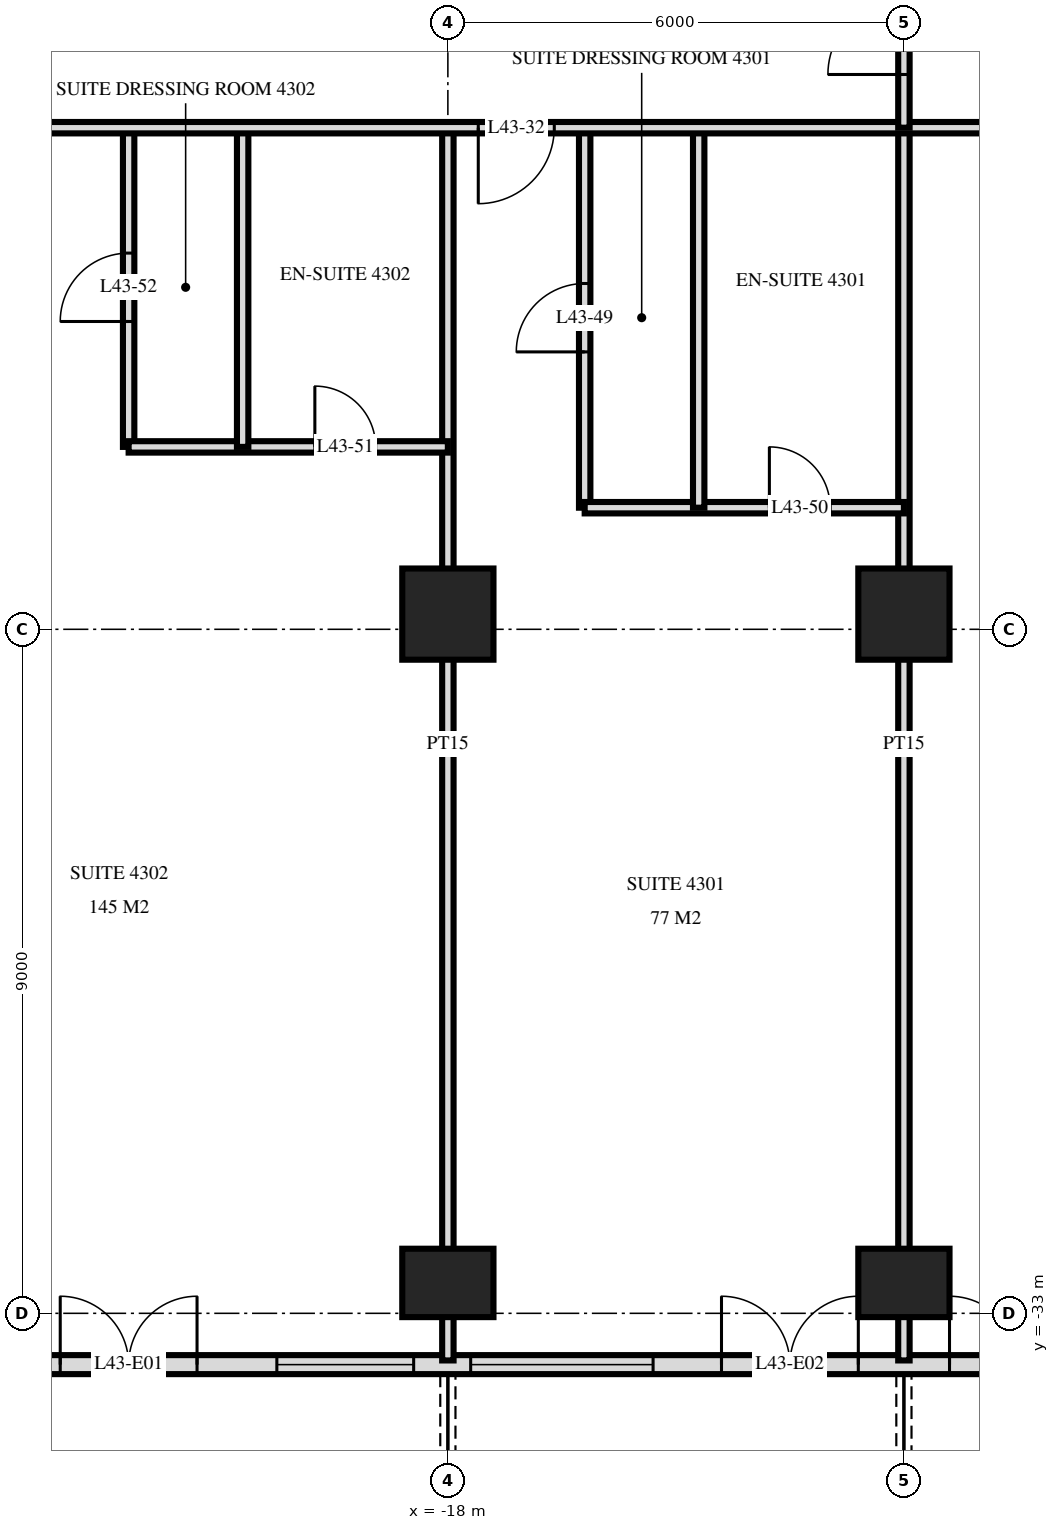
"""IFC4 building model, lengths in metres.
Left out: names, types, materials, properties, quantities, classifications, styles, units other than length and angle.
Written with IfcOpenShell. Run it as: python <this file> out.ifc"""

import sys

from ifc_helpers import new_model, si_unit, direction, frame, frame_2d, origin, origin_2d, place, context, subcontext, project, spatial, rectangle, extrude, element, fill, save


model = new_model("IFC4")
c1 = context("Model", 3, precision=1e-05, world=origin(), true_north=direction((0.0, 1.0)))
c2 = subcontext(c1, "Body", "Model", "MODEL_VIEW")
j1 = project(units=[si_unit("LENGTHUNIT", "METRE"), si_unit("PLANEANGLEUNIT", "RADIAN")], contexts=[c1])
p1 = place(None, origin())
s1 = spatial("IfcSite", under=j1, at=p1, CompositionType="ELEMENT")
p2 = place(p1, origin())
s2 = spatial("IfcBuilding", under=s1, at=p2, CompositionType="ELEMENT")
p3 = place(p2, frame((0.0, 0.0, 166.8)))
s3 = spatial("IfcBuildingStorey", under=s2, at=p3, CompositionType="ELEMENT", Elevation=166.8)
p4 = place(p3, frame((-18.0, -32.6, 0.0), z_axis=(0.0, 0.0, 1.0), x_axis=(1.0, 0.0, 0.0)))
e1 = element("IfcColumn", 1, at=p4, inside=s3, PredefinedType="COLUMN", context=c2, shape_type="SweptSolid", body=[
    extrude(rectangle(XDim=1.2, YDim=0.9, at=origin_2d()), origin(), (0.0, 0.0, 1.0), 3.6),
])
p5 = place(p3, frame((-18.0, -23.8, 0.0), z_axis=(0.0, 0.0, 1.0), x_axis=(1.0, 0.0, 0.0)))
e2 = element("IfcColumn", 2, at=p5, inside=s3, PredefinedType="COLUMN", context=c2, shape_type="SweptSolid", body=[
    extrude(rectangle(XDim=1.2, YDim=1.2, at=origin_2d()), origin(), (0.0, 0.0, 1.0), 3.6),
])
p6 = place(p3, frame((-12.0, -32.6, 0.0), z_axis=(0.0, 0.0, 1.0), x_axis=(1.0, 0.0, 0.0)))
e3 = element("IfcColumn", 3, at=p6, inside=s3, PredefinedType="COLUMN", context=c2, shape_type="SweptSolid", body=[
    extrude(rectangle(XDim=1.2, YDim=0.9, at=origin_2d()), origin(), (0.0, 0.0, 1.0), 3.6),
])
p7 = place(p3, frame((-12.0, -23.8, 0.0), z_axis=(0.0, 0.0, 1.0), x_axis=(1.0, 0.0, 0.0)))
e4 = element("IfcColumn", 4, at=p7, inside=s3, PredefinedType="COLUMN", context=c2, shape_type="SweptSolid", body=[
    extrude(rectangle(XDim=1.2, YDim=1.2, at=origin_2d()), origin(), (0.0, 0.0, 1.0), 3.6),
])
p8 = place(p3, frame((-23.675, -33.675, 0.0), z_axis=(0.0, 0.0, 1.0), x_axis=(1.0, 0.0, 0.0)))
e5 = element("IfcWall", 5, at=p8, inside=s3, PredefinedType="SOLIDWALL", context=c2, shape_type="SweptSolid", body=[
    extrude(rectangle(XDim=47.351, YDim=0.25, at=frame_2d((23.675, 0.0))), origin(), (0.0, 0.0, 1.0), 3.32),
])
p9 = place(p8, frame((0.575, 0.0, 0.0)))
e6 = element("IfcOpeningElement", 6, at=p9, cuts=e5, PredefinedType="OPENING", context=c2, shape_type="SweptSolid", body=[
    extrude(rectangle(XDim=1.8, YDim=2.4, at=frame_2d((0.9, 1.2))), frame((0.0, 0.135, 0.0), z_axis=(0.0, -1.0, 0.0), x_axis=(1.0, 0.0, 0.0)), (0.0, 0.0, 1.0), 0.27),
])
p10 = place(p8, frame((3.425, 0.0, 0.3)))
e7 = element("IfcOpeningElement", 7, at=p10, cuts=e5, PredefinedType="OPENING", context=c2, shape_type="SweptSolid", body=[
    extrude(rectangle(XDim=1.8, YDim=2.1, at=frame_2d((0.9, 1.05))), frame((0.0, 0.135, 0.0), z_axis=(0.0, -1.0, 0.0), x_axis=(1.0, 0.0, 0.0)), (0.0, 0.0, 1.0), 0.27),
])
p11 = place(p8, frame((5.975, 0.0, 0.3)))
e8 = element("IfcOpeningElement", 8, at=p11, cuts=e5, PredefinedType="OPENING", context=c2, shape_type="SweptSolid", body=[
    extrude(rectangle(XDim=2.4, YDim=2.1, at=frame_2d((1.2, 1.05))), frame((0.0, 0.135, 0.0), z_axis=(0.0, -1.0, 0.0), x_axis=(1.0, 0.0, 0.0)), (0.0, 0.0, 1.0), 0.27),
])
p12 = place(p8, frame((9.275, 0.0, 0.0)))
e9 = element("IfcOpeningElement", 9, at=p12, cuts=e5, PredefinedType="OPENING", context=c2, shape_type="SweptSolid", body=[
    extrude(rectangle(XDim=1.8, YDim=2.4, at=frame_2d((0.9, 1.2))), frame((0.0, 0.135, 0.0), z_axis=(0.0, -1.0, 0.0), x_axis=(1.0, 0.0, 0.0)), (0.0, 0.0, 1.0), 0.27),
])
p13 = place(p8, frame((12.275, 0.0, 0.0)))
e10 = element("IfcOpeningElement", 10, at=p13, cuts=e5, PredefinedType="OPENING", context=c2, shape_type="SweptSolid", body=[
    extrude(rectangle(XDim=1.8, YDim=2.4, at=frame_2d((0.9, 1.2))), frame((0.0, 0.135, 0.0), z_axis=(0.0, -1.0, 0.0), x_axis=(1.0, 0.0, 0.0)), (0.0, 0.0, 1.0), 0.27),
])
p14 = place(p8, frame((14.975, 0.0, 0.3)))
e11 = element("IfcOpeningElement", 11, at=p14, cuts=e5, PredefinedType="OPENING", context=c2, shape_type="SweptSolid", body=[
    extrude(rectangle(XDim=2.4, YDim=2.1, at=frame_2d((1.2, 1.05))), frame((0.0, 0.135, 0.0), z_axis=(0.0, -1.0, 0.0), x_axis=(1.0, 0.0, 0.0)), (0.0, 0.0, 1.0), 0.27),
])
p15 = place(p8, frame((17.975, 0.0, 0.3)))
e12 = element("IfcOpeningElement", 12, at=p15, cuts=e5, PredefinedType="OPENING", context=c2, shape_type="SweptSolid", body=[
    extrude(rectangle(XDim=2.4, YDim=2.1, at=frame_2d((1.2, 1.05))), frame((0.0, 0.135, 0.0), z_axis=(0.0, -1.0, 0.0), x_axis=(1.0, 0.0, 0.0)), (0.0, 0.0, 1.0), 0.27),
])
p16 = place(p8, frame((21.275, 0.0, 0.0)))
e13 = element("IfcOpeningElement", 13, at=p16, cuts=e5, PredefinedType="OPENING", context=c2, shape_type="SweptSolid", body=[
    extrude(rectangle(XDim=1.8, YDim=2.4, at=frame_2d((0.9, 1.2))), frame((0.0, 0.135, 0.0), z_axis=(0.0, -1.0, 0.0), x_axis=(1.0, 0.0, 0.0)), (0.0, 0.0, 1.0), 0.27),
])
p17 = place(p8, frame((24.275, 0.0, 0.0)))
e14 = element("IfcOpeningElement", 14, at=p17, cuts=e5, PredefinedType="OPENING", context=c2, shape_type="SweptSolid", body=[
    extrude(rectangle(XDim=1.8, YDim=2.4, at=frame_2d((0.9, 1.2))), frame((0.0, 0.135, 0.0), z_axis=(0.0, -1.0, 0.0), x_axis=(1.0, 0.0, 0.0)), (0.0, 0.0, 1.0), 0.27),
])
p18 = place(p8, frame((26.975, 0.0, 0.3)))
e15 = element("IfcOpeningElement", 15, at=p18, cuts=e5, PredefinedType="OPENING", context=c2, shape_type="SweptSolid", body=[
    extrude(rectangle(XDim=2.4, YDim=2.1, at=frame_2d((1.2, 1.05))), frame((0.0, 0.135, 0.0), z_axis=(0.0, -1.0, 0.0), x_axis=(1.0, 0.0, 0.0)), (0.0, 0.0, 1.0), 0.27),
])
p19 = place(p8, frame((30.275, 0.0, 0.0)))
e16 = element("IfcOpeningElement", 16, at=p19, cuts=e5, PredefinedType="OPENING", context=c2, shape_type="SweptSolid", body=[
    extrude(rectangle(XDim=1.8, YDim=2.4, at=frame_2d((0.9, 1.2))), frame((0.0, 0.135, 0.0), z_axis=(0.0, -1.0, 0.0), x_axis=(1.0, 0.0, 0.0)), (0.0, 0.0, 1.0), 0.27),
])
p20 = place(p8, frame((32.975, 0.0, 0.3)))
e17 = element("IfcOpeningElement", 17, at=p20, cuts=e5, PredefinedType="OPENING", context=c2, shape_type="SweptSolid", body=[
    extrude(rectangle(XDim=2.4, YDim=2.1, at=frame_2d((1.2, 1.05))), frame((0.0, 0.135, 0.0), z_axis=(0.0, -1.0, 0.0), x_axis=(1.0, 0.0, 0.0)), (0.0, 0.0, 1.0), 0.27),
])
p21 = place(p8, frame((35.975, 0.0, 0.3)))
e18 = element("IfcOpeningElement", 18, at=p21, cuts=e5, PredefinedType="OPENING", context=c2, shape_type="SweptSolid", body=[
    extrude(rectangle(XDim=2.4, YDim=2.1, at=frame_2d((1.2, 1.05))), frame((0.0, 0.135, 0.0), z_axis=(0.0, -1.0, 0.0), x_axis=(1.0, 0.0, 0.0)), (0.0, 0.0, 1.0), 0.27),
])
p22 = place(p8, frame((39.275, 0.0, 0.0)))
e19 = element("IfcOpeningElement", 19, at=p22, cuts=e5, PredefinedType="OPENING", context=c2, shape_type="SweptSolid", body=[
    extrude(rectangle(XDim=1.8, YDim=2.4, at=frame_2d((0.9, 1.2))), frame((0.0, 0.135, 0.0), z_axis=(0.0, -1.0, 0.0), x_axis=(1.0, 0.0, 0.0)), (0.0, 0.0, 1.0), 0.27),
])
p23 = place(p8, frame((42.275, 0.0, 0.0)))
e20 = element("IfcOpeningElement", 20, at=p23, cuts=e5, PredefinedType="OPENING", context=c2, shape_type="SweptSolid", body=[
    extrude(rectangle(XDim=1.8, YDim=2.4, at=frame_2d((0.9, 1.2))), frame((0.0, 0.135, 0.0), z_axis=(0.0, -1.0, 0.0), x_axis=(1.0, 0.0, 0.0)), (0.0, 0.0, 1.0), 0.27),
])
p24 = place(p8, frame((45.125, 0.0, 0.3)))
e21 = element("IfcOpeningElement", 21, at=p24, cuts=e5, PredefinedType="OPENING", context=c2, shape_type="SweptSolid", body=[
    extrude(rectangle(XDim=1.8, YDim=2.1, at=frame_2d((0.9, 1.05))), frame((0.0, 0.135, 0.0), z_axis=(0.0, -1.0, 0.0), x_axis=(1.0, 0.0, 0.0)), (0.0, 0.0, 1.0), 0.27),
])
p25 = place(p3, frame((-12.0, -17.4, 0.0), z_axis=(0.0, 0.0, 1.0), x_axis=(0.0, 1.0, 0.0)))
e22 = element("IfcWall", 22, at=p25, inside=s3, PredefinedType="PARTITIONING", context=c2, shape_type="SweptSolid", body=[
    extrude(rectangle(XDim=2.35, YDim=0.15, at=frame_2d((1.175, 0.0))), origin(), (0.0, 0.0, 1.0), 3.32),
])
p26 = place(p25, frame((0.7, 0.0, 0.0)))
e23 = element("IfcOpeningElement", 23, at=p26, cuts=e22, PredefinedType="OPENING", context=c2, shape_type="SweptSolid", body=[
    extrude(rectangle(XDim=1.0, YDim=2.1, at=frame_2d((0.5, 1.05))), frame((0.0, 0.085, 0.0), z_axis=(0.0, -1.0, 0.0), x_axis=(1.0, 0.0, 0.0)), (0.0, 0.0, 1.0), 0.17),
])
p27 = place(p3, frame((-12.0, -33.62, 0.0), z_axis=(0.0, 0.0, 1.0), x_axis=(0.0, 1.0, 0.0)))
e24 = element("IfcWall", 24, at=p27, inside=s3, PredefinedType="PARTITIONING", context=c2, shape_type="SweptSolid", body=[
    extrude(rectangle(XDim=16.22, YDim=0.15, at=frame_2d((8.11, 0.0))), origin(), (0.0, 0.0, 1.0), 3.32),
])
p28 = place(p3, frame((-14.7, -22.4, 0.0), z_axis=(0.0, 0.0, 1.0), x_axis=(0.0, 1.0, 0.0)))
e25 = element("IfcWall", 25, at=p28, inside=s3, PredefinedType="PARTITIONING", context=c2, shape_type="SweptSolid", body=[
    extrude(rectangle(XDim=5.0, YDim=0.15, at=frame_2d((2.5, 0.0))), origin(), (0.0, 0.0, 1.0), 3.32),
])
p29 = place(p3, frame((-16.2, -22.4, 0.0), z_axis=(0.0, 0.0, 1.0), x_axis=(0.0, 1.0, 0.0)))
e26 = element("IfcWall", 26, at=p29, inside=s3, PredefinedType="PARTITIONING", context=c2, shape_type="SweptSolid", body=[
    extrude(rectangle(XDim=5.0, YDim=0.15, at=frame_2d((2.5, 0.0))), origin(), (0.0, 0.0, 1.0), 3.32),
])
p30 = place(p29, frame((2.05, 0.0, 0.0)))
e27 = element("IfcOpeningElement", 27, at=p30, cuts=e26, PredefinedType="OPENING", context=c2, shape_type="SweptSolid", body=[
    extrude(rectangle(XDim=0.9, YDim=2.1, at=frame_2d((0.45, 1.05))), frame((0.0, 0.085, 0.0), z_axis=(0.0, -1.0, 0.0), x_axis=(1.0, 0.0, 0.0)), (0.0, 0.0, 1.0), 0.17),
])
p31 = place(p3, frame((-18.0, -33.62, 0.0), z_axis=(0.0, 0.0, 1.0), x_axis=(0.0, 1.0, 0.0)))
e28 = element("IfcWall", 28, at=p31, inside=s3, PredefinedType="PARTITIONING", context=c2, shape_type="SweptSolid", body=[
    extrude(rectangle(XDim=16.22, YDim=0.15, at=frame_2d((8.11, 0.0))), origin(), (0.0, 0.0, 1.0), 3.32),
])
p32 = place(p3, frame((-20.7, -21.6, 0.0), z_axis=(0.0, 0.0, 1.0), x_axis=(0.0, 1.0, 0.0)))
e29 = element("IfcWall", 29, at=p32, inside=s3, PredefinedType="PARTITIONING", context=c2, shape_type="SweptSolid", body=[
    extrude(rectangle(XDim=4.2, YDim=0.15, at=frame_2d((2.1, 0.0))), origin(), (0.0, 0.0, 1.0), 3.32),
])
p33 = place(p3, frame((-22.2, -21.6, 0.0), z_axis=(0.0, 0.0, 1.0), x_axis=(0.0, 1.0, 0.0)))
e30 = element("IfcWall", 30, at=p33, inside=s3, PredefinedType="PARTITIONING", context=c2, shape_type="SweptSolid", body=[
    extrude(rectangle(XDim=4.2, YDim=0.15, at=frame_2d((2.1, 0.0))), origin(), (0.0, 0.0, 1.0), 3.32),
])
p34 = place(p33, frame((1.65, 0.0, 0.0)))
e31 = element("IfcOpeningElement", 31, at=p34, cuts=e30, PredefinedType="OPENING", context=c2, shape_type="SweptSolid", body=[
    extrude(rectangle(XDim=0.9, YDim=2.1, at=frame_2d((0.45, 1.05))), frame((0.0, 0.085, 0.0), z_axis=(0.0, -1.0, 0.0), x_axis=(1.0, 0.0, 0.0)), (0.0, 0.0, 1.0), 0.17),
])
p35 = place(p3, frame((-16.2, -22.4, 0.0), z_axis=(0.0, 0.0, 1.0), x_axis=(1.0, 0.0, 0.0)))
e32 = element("IfcWall", 32, at=p35, inside=s3, PredefinedType="PARTITIONING", context=c2, shape_type="SweptSolid", body=[
    extrude(rectangle(XDim=4.2, YDim=0.15, at=frame_2d((2.1, 0.0))), origin(), (0.0, 0.0, 1.0), 3.32),
])
p36 = place(p35, frame((2.43, 0.0, 0.0)))
e33 = element("IfcOpeningElement", 33, at=p36, cuts=e32, PredefinedType="OPENING", context=c2, shape_type="SweptSolid", body=[
    extrude(rectangle(XDim=0.8, YDim=2.1, at=frame_2d((0.4, 1.05))), frame((0.0, 0.085, 0.0), z_axis=(0.0, -1.0, 0.0), x_axis=(1.0, 0.0, 0.0)), (0.0, 0.0, 1.0), 0.17),
])
p37 = place(p3, frame((-22.2, -21.6, 0.0), z_axis=(0.0, 0.0, 1.0), x_axis=(1.0, 0.0, 0.0)))
e34 = element("IfcWall", 34, at=p37, inside=s3, PredefinedType="PARTITIONING", context=c2, shape_type="SweptSolid", body=[
    extrude(rectangle(XDim=4.2, YDim=0.15, at=frame_2d((2.1, 0.0))), origin(), (0.0, 0.0, 1.0), 3.32),
])
p38 = place(p37, frame((2.45, 0.0, 0.0)))
e35 = element("IfcOpeningElement", 35, at=p38, cuts=e34, PredefinedType="OPENING", context=c2, shape_type="SweptSolid", body=[
    extrude(rectangle(XDim=0.8, YDim=2.1, at=frame_2d((0.4, 1.05))), frame((0.0, 0.085, 0.0), z_axis=(0.0, -1.0, 0.0), x_axis=(1.0, 0.0, 0.0)), (0.0, 0.0, 1.0), 0.17),
])
p39 = place(p3, frame((-28.02, -17.4, 0.0), z_axis=(0.0, 0.0, 1.0), x_axis=(1.0, 0.0, 0.0)))
e36 = element("IfcWall", 36, at=p39, inside=s3, PredefinedType="PARTITIONING", context=c2, shape_type="SweptSolid", body=[
    extrude(rectangle(XDim=56.04, YDim=0.15, at=frame_2d((28.02, 0.0))), origin(), (0.0, 0.0, 1.0), 3.32),
])
p40 = place(p39, frame((10.42, 0.0, 0.0)))
e37 = element("IfcOpeningElement", 37, at=p40, cuts=e36, PredefinedType="OPENING", context=c2, shape_type="SweptSolid", body=[
    extrude(rectangle(XDim=1.0, YDim=2.1, at=frame_2d((0.5, 1.05))), frame((0.0, 0.085, 0.0), z_axis=(0.0, -1.0, 0.0), x_axis=(1.0, 0.0, 0.0)), (0.0, 0.0, 1.0), 0.17),
])
p41 = place(p39, frame((2.32, 0.0, 0.0)))
e38 = element("IfcOpeningElement", 38, at=p41, cuts=e36, PredefinedType="OPENING", context=c2, shape_type="SweptSolid", body=[
    extrude(rectangle(XDim=1.0, YDim=2.1, at=frame_2d((0.5, 1.05))), frame((0.0, 0.085, 0.0), z_axis=(0.0, -1.0, 0.0), x_axis=(1.0, 0.0, 0.0)), (0.0, 0.0, 1.0), 0.17),
])
p42 = place(p39, frame((49.72, 0.0, 0.0)))
e39 = element("IfcOpeningElement", 39, at=p42, cuts=e36, PredefinedType="OPENING", context=c2, shape_type="SweptSolid", body=[
    extrude(rectangle(XDim=1.0, YDim=2.1, at=frame_2d((0.5, 1.05))), frame((0.0, 0.085, 0.0), z_axis=(0.0, -1.0, 0.0), x_axis=(1.0, 0.0, 0.0)), (0.0, 0.0, 1.0), 0.17),
])
p43 = place(p39, frame((23.02, 0.0, 0.0)))
e40 = element("IfcOpeningElement", 40, at=p43, cuts=e36, PredefinedType="OPENING", context=c2, shape_type="SweptSolid", body=[
    extrude(rectangle(XDim=1.0, YDim=2.1, at=frame_2d((0.5, 1.05))), frame((0.0, 0.085, 0.0), z_axis=(0.0, -1.0, 0.0), x_axis=(1.0, 0.0, 0.0)), (0.0, 0.0, 1.0), 0.17),
])
p44 = place(p39, frame((35.02, 0.0, 0.0)))
e41 = element("IfcOpeningElement", 41, at=p44, cuts=e36, PredefinedType="OPENING", context=c2, shape_type="SweptSolid", body=[
    extrude(rectangle(XDim=1.0, YDim=2.1, at=frame_2d((0.5, 1.05))), frame((0.0, 0.085, 0.0), z_axis=(0.0, -1.0, 0.0), x_axis=(1.0, 0.0, 0.0)), (0.0, 0.0, 1.0), 0.17),
])
p45 = place(p9, origin())
e42 = element("IfcDoor", 42, at=p45, inside=s3, OperationType="DOUBLE_DOOR_SINGLE_SWING", PredefinedType="DOOR", context=c2, shape_type="SweptSolid", body=[
    extrude(rectangle(XDim=1.8, YDim=2.4, at=frame_2d((0.9, 1.2))), frame((0.0, 0.025, 0.0), z_axis=(0.0, -1.0, 0.0), x_axis=(1.0, 0.0, 0.0)), (0.0, 0.0, 1.0), 0.05),
])
fill(e6, e42)
p46 = place(p10, origin())
e43 = element("IfcWindow", 43, at=p46, inside=s3, PartitioningType="SINGLE_PANEL", PredefinedType="WINDOW", context=c2, shape_type="SweptSolid", body=[
    extrude(rectangle(XDim=1.8, YDim=2.1, at=frame_2d((0.9, 1.05))), frame((0.0, 0.03, 0.0), z_axis=(0.0, -1.0, 0.0), x_axis=(1.0, 0.0, 0.0)), (0.0, 0.0, 1.0), 0.06),
])
fill(e7, e43)
p47 = place(p11, origin())
e44 = element("IfcWindow", 44, at=p47, inside=s3, PartitioningType="SINGLE_PANEL", PredefinedType="WINDOW", context=c2, shape_type="SweptSolid", body=[
    extrude(rectangle(XDim=2.4, YDim=2.1, at=frame_2d((1.2, 1.05))), frame((0.0, 0.03, 0.0), z_axis=(0.0, -1.0, 0.0), x_axis=(1.0, 0.0, 0.0)), (0.0, 0.0, 1.0), 0.06),
])
fill(e8, e44)
p48 = place(p12, origin())
e45 = element("IfcDoor", 45, at=p48, inside=s3, OperationType="DOUBLE_DOOR_SINGLE_SWING", PredefinedType="DOOR", context=c2, shape_type="SweptSolid", body=[
    extrude(rectangle(XDim=1.8, YDim=2.4, at=frame_2d((0.9, 1.2))), frame((0.0, 0.025, 0.0), z_axis=(0.0, -1.0, 0.0), x_axis=(1.0, 0.0, 0.0)), (0.0, 0.0, 1.0), 0.05),
])
fill(e9, e45)
p49 = place(p13, origin())
e46 = element("IfcDoor", 46, at=p49, inside=s3, OperationType="DOUBLE_DOOR_SINGLE_SWING", PredefinedType="DOOR", context=c2, shape_type="SweptSolid", body=[
    extrude(rectangle(XDim=1.8, YDim=2.4, at=frame_2d((0.9, 1.2))), frame((0.0, 0.025, 0.0), z_axis=(0.0, -1.0, 0.0), x_axis=(1.0, 0.0, 0.0)), (0.0, 0.0, 1.0), 0.05),
])
fill(e10, e46)
p50 = place(p26, origin())
e47 = element("IfcDoor", 47, at=p50, inside=s3, OperationType="SINGLE_SWING_RIGHT", PredefinedType="DOOR", context=c2, shape_type="SweptSolid", body=[
    extrude(rectangle(XDim=1.0, YDim=2.1, at=frame_2d((0.5, 1.05))), frame((0.0, 0.025, 0.0), z_axis=(0.0, -1.0, 0.0), x_axis=(1.0, 0.0, 0.0)), (0.0, 0.0, 1.0), 0.05),
])
fill(e23, e47)
p51 = place(p40, frame((0.5, 0.0, 0.0), z_axis=(0.0, 0.0, 1.0), x_axis=(-1.0, 0.0, 0.0)))
e48 = element("IfcDoor", 48, at=p51, inside=s3, OperationType="SINGLE_SWING_LEFT", PredefinedType="DOOR", context=c2, shape_type="SweptSolid", body=[
    extrude(rectangle(XDim=1.0, YDim=2.1, at=frame_2d((0.0, 1.05))), frame((0.0, -0.025, 0.0), z_axis=(0.0, 1.0, 0.0), x_axis=(-1.0, 0.0, 0.0)), (0.0, 0.0, 1.0), 0.05),
])
fill(e37, e48)
p52 = place(p30, origin())
e49 = element("IfcDoor", 49, at=p52, inside=s3, OperationType="SINGLE_SWING_RIGHT", PredefinedType="DOOR", context=c2, shape_type="SweptSolid", body=[
    extrude(rectangle(XDim=0.9, YDim=2.1, at=frame_2d((0.45, 1.05))), frame((0.0, 0.025, 0.0), z_axis=(0.0, -1.0, 0.0), x_axis=(1.0, 0.0, 0.0)), (0.0, 0.0, 1.0), 0.05),
])
fill(e27, e49)
p53 = place(p36, origin())
e50 = element("IfcDoor", 50, at=p53, inside=s3, OperationType="SINGLE_SWING_RIGHT", PredefinedType="DOOR", context=c2, shape_type="SweptSolid", body=[
    extrude(rectangle(XDim=0.8, YDim=2.1, at=frame_2d((0.4, 1.05))), frame((0.0, 0.025, 0.0), z_axis=(0.0, -1.0, 0.0), x_axis=(1.0, 0.0, 0.0)), (0.0, 0.0, 1.0), 0.05),
])
fill(e33, e50)
p54 = place(p38, origin())
e51 = element("IfcDoor", 51, at=p54, inside=s3, OperationType="SINGLE_SWING_RIGHT", PredefinedType="DOOR", context=c2, shape_type="SweptSolid", body=[
    extrude(rectangle(XDim=0.8, YDim=2.1, at=frame_2d((0.4, 1.05))), frame((0.0, 0.025, 0.0), z_axis=(0.0, -1.0, 0.0), x_axis=(1.0, 0.0, 0.0)), (0.0, 0.0, 1.0), 0.05),
])
fill(e35, e51)
p55 = place(p34, origin())
e52 = element("IfcDoor", 52, at=p55, inside=s3, OperationType="SINGLE_SWING_RIGHT", PredefinedType="DOOR", context=c2, shape_type="SweptSolid", body=[
    extrude(rectangle(XDim=0.9, YDim=2.1, at=frame_2d((0.45, 1.05))), frame((0.0, 0.025, 0.0), z_axis=(0.0, -1.0, 0.0), x_axis=(1.0, 0.0, 0.0)), (0.0, 0.0, 1.0), 0.05),
])
fill(e31, e52)
save(model, sys.argv[1])
